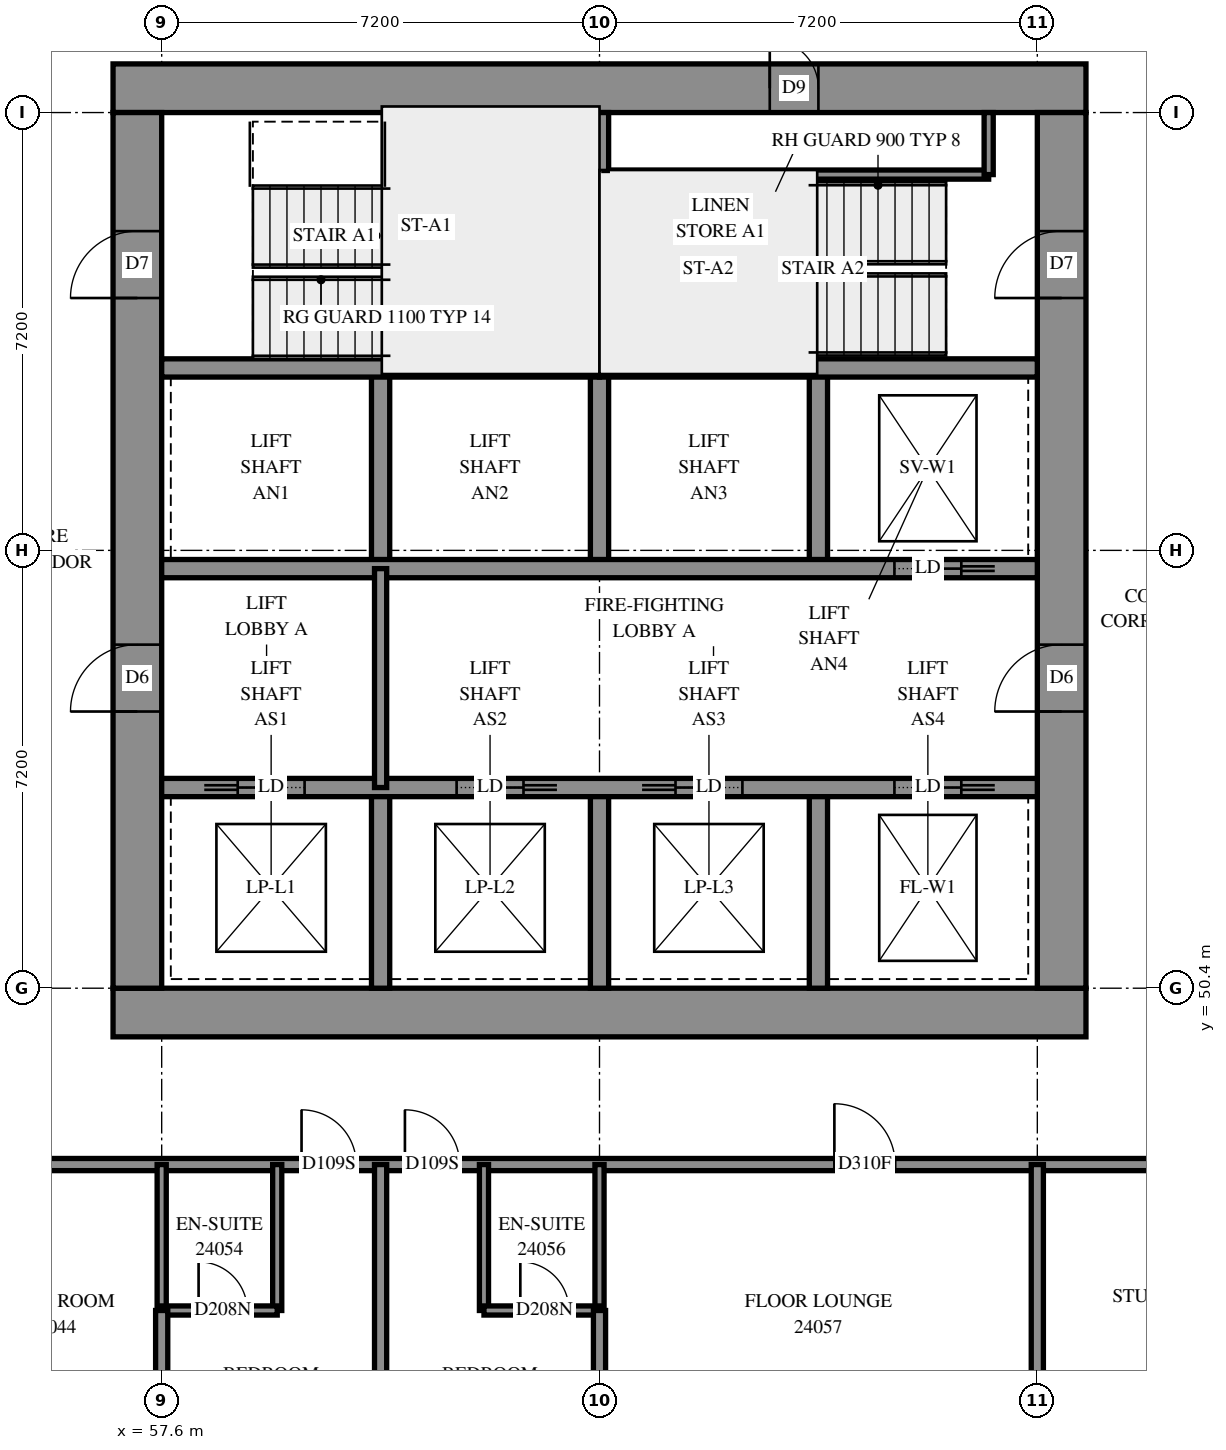
"""IFC4 building model, lengths in metres.
Left out: names, types, materials, properties, quantities, classifications, styles, units other than length and angle.
Written with IfcOpenShell. Run it as: python <this file> out.ifc"""

import sys

from ifc_helpers import new_model, si_unit, direction, frame, frame_2d, origin, place, context, subcontext, project, spatial, rectangle, extrude, element, fill, save


model = new_model("IFC4")
c1 = context("Model", 3, precision=1e-05, world=origin(), true_north=direction((0.0, 1.0)))
c2 = subcontext(c1, "Body", "Model", "MODEL_VIEW")
j1 = project(units=[si_unit("LENGTHUNIT", "METRE"), si_unit("PLANEANGLEUNIT", "RADIAN")], contexts=[c1])
p1 = place(None, origin())
s1 = spatial("IfcSite", under=j1, at=p1, CompositionType="ELEMENT")
p2 = place(p1, origin())
s2 = spatial("IfcBuilding", under=s1, at=p2, CompositionType="ELEMENT")
p3 = place(p2, frame((0.0, 0.0, 91.4)))
s3 = spatial("IfcBuildingStorey", under=s2, at=p3, CompositionType="ELEMENT", Elevation=91.4)
p4 = place(p3, frame((56.8, 50.0, -0.3), z_axis=(0.0, 0.0, 1.0), x_axis=(1.0, 0.0, 0.0)))
e1 = element("IfcWall", 1, at=p4, inside=s3, PredefinedType="SHEAR", context=c2, shape_type="SweptSolid", body=[
    extrude(rectangle(XDim=16.0, YDim=0.8, at=frame_2d((8.0, 0.0))), origin(), (0.0, 0.0, 1.0), 2.7),
])
p5 = place(p3, frame((56.8, 65.2, -0.3), z_axis=(0.0, 0.0, 1.0), x_axis=(1.0, 0.0, 0.0)))
e2 = element("IfcWall", 2, at=p5, inside=s3, PredefinedType="SHEAR", context=c2, shape_type="SweptSolid", body=[
    extrude(rectangle(XDim=16.0, YDim=0.8, at=frame_2d((8.0, 0.0))), origin(), (0.0, 0.0, 1.0), 2.7),
])
p6 = place(p5, frame((10.8, 0.0, 0.3)))
e3 = element("IfcOpeningElement", 3, at=p6, cuts=e2, PredefinedType="OPENING", context=c2, shape_type="SweptSolid", body=[
    extrude(rectangle(XDim=0.8, YDim=2.1, at=frame_2d((0.4, 1.05))), frame((0.0, 0.41, 0.0), z_axis=(0.0, -1.0, 0.0), x_axis=(1.0, 0.0, 0.0)), (0.0, 0.0, 1.0), 0.82),
])
p7 = place(p3, frame((57.2, 50.4, -0.3), z_axis=(0.0, 0.0, 1.0), x_axis=(0.0, 1.0, 0.0)))
e4 = element("IfcWall", 4, at=p7, inside=s3, PredefinedType="SHEAR", context=c2, shape_type="SweptSolid", body=[
    extrude(rectangle(XDim=14.4, YDim=0.8, at=frame_2d((7.2, 0.0))), origin(), (0.0, 0.0, 1.0), 2.7),
])
p8 = place(p7, frame((4.55, 0.0, 0.3)))
e5 = element("IfcOpeningElement", 5, at=p8, cuts=e4, PredefinedType="OPENING", context=c2, shape_type="SweptSolid", body=[
    extrude(rectangle(XDim=1.1, YDim=2.1, at=frame_2d((0.55, 1.05))), frame((0.0, 0.41, 0.0), z_axis=(0.0, -1.0, 0.0), x_axis=(1.0, 0.0, 0.0)), (0.0, 0.0, 1.0), 0.82),
])
p9 = place(p7, frame((11.35, 0.0, 0.3)))
e6 = element("IfcOpeningElement", 6, at=p9, cuts=e4, PredefinedType="OPENING", context=c2, shape_type="SweptSolid", body=[
    extrude(rectangle(XDim=1.1, YDim=2.1, at=frame_2d((0.55, 1.05))), frame((0.0, 0.41, 0.0), z_axis=(0.0, -1.0, 0.0), x_axis=(1.0, 0.0, 0.0)), (0.0, 0.0, 1.0), 0.82),
])
p10 = place(p3, frame((72.4, 50.4, -0.3), z_axis=(0.0, 0.0, 1.0), x_axis=(0.0, 1.0, 0.0)))
e7 = element("IfcWall", 7, at=p10, inside=s3, PredefinedType="SHEAR", context=c2, shape_type="SweptSolid", body=[
    extrude(rectangle(XDim=14.4, YDim=0.8, at=frame_2d((7.2, 0.0))), origin(), (0.0, 0.0, 1.0), 2.7),
])
p11 = place(p10, frame((4.55, 0.0, 0.3)))
e8 = element("IfcOpeningElement", 8, at=p11, cuts=e7, PredefinedType="OPENING", context=c2, shape_type="SweptSolid", body=[
    extrude(rectangle(XDim=1.1, YDim=2.1, at=frame_2d((0.55, 1.05))), frame((0.0, 0.41, 0.0), z_axis=(0.0, -1.0, 0.0), x_axis=(1.0, 0.0, 0.0)), (0.0, 0.0, 1.0), 0.82),
])
p12 = place(p10, frame((11.35, 0.0, 0.3)))
e9 = element("IfcOpeningElement", 9, at=p12, cuts=e7, PredefinedType="OPENING", context=c2, shape_type="SweptSolid", body=[
    extrude(rectangle(XDim=1.1, YDim=2.1, at=frame_2d((0.55, 1.05))), frame((0.0, 0.41, 0.0), z_axis=(0.0, -1.0, 0.0), x_axis=(1.0, 0.0, 0.0)), (0.0, 0.0, 1.0), 0.82),
])
for number, where, z_axis, x_axis in (
    (10, (61.2, 50.4, 0.0), (0.0, 0.0, 1.0), (0.0, 1.0, 0.0)),
    (11, (61.2, 57.3, 0.0), (0.0, 0.0, 1.0), (0.0, 1.0, 0.0)),
    (12, (64.8, 50.4, 0.0), (0.0, 0.0, 1.0), (0.0, 1.0, 0.0)),
    (13, (64.8, 57.3, 0.0), (0.0, 0.0, 1.0), (0.0, 1.0, 0.0)),
    (14, (68.4, 50.4, 0.0), (0.0, 0.0, 1.0), (0.0, 1.0, 0.0)),
    (15, (68.4, 57.3, 0.0), (0.0, 0.0, 1.0), (0.0, 1.0, 0.0)),
):
    element("IfcWall", number, at=place(p3, frame(where, z_axis=z_axis, x_axis=x_axis)), inside=s3, PredefinedType="SOLIDWALL", context=c2, shape_type="SweptSolid", body=[
        extrude(rectangle(XDim=3.3, YDim=0.3, at=frame_2d((1.65, 0.0))), origin(), (0.0, 0.0, 1.0), 3.1),
    ])
p13 = place(p3, frame((57.6, 53.7, 0.0), z_axis=(0.0, 0.0, 1.0), x_axis=(1.0, 0.0, 0.0)))
e16 = element("IfcWall", 16, at=p13, inside=s3, PredefinedType="SOLIDWALL", context=c2, shape_type="SweptSolid", body=[
    extrude(rectangle(XDim=14.4, YDim=0.3, at=frame_2d((7.2, 0.0))), origin(), (0.0, 0.0, 1.0), 3.1),
])
p14 = place(p13, frame((1.25, 0.0, 0.0)))
e17 = element("IfcOpeningElement", 17, at=p14, cuts=e16, PredefinedType="OPENING", context=c2, shape_type="SweptSolid", body=[
    extrude(rectangle(XDim=1.1, YDim=2.1, at=frame_2d((0.55, 1.05))), frame((0.0, 0.16, 0.0), z_axis=(0.0, -1.0, 0.0), x_axis=(1.0, 0.0, 0.0)), (0.0, 0.0, 1.0), 0.32),
])
p15 = place(p13, frame((4.85, 0.0, 0.0)))
e18 = element("IfcOpeningElement", 18, at=p15, cuts=e16, PredefinedType="OPENING", context=c2, shape_type="SweptSolid", body=[
    extrude(rectangle(XDim=1.1, YDim=2.1, at=frame_2d((0.55, 1.05))), frame((0.0, 0.16, 0.0), z_axis=(0.0, -1.0, 0.0), x_axis=(1.0, 0.0, 0.0)), (0.0, 0.0, 1.0), 0.32),
])
p16 = place(p13, frame((8.45, 0.0, 0.0)))
e19 = element("IfcOpeningElement", 19, at=p16, cuts=e16, PredefinedType="OPENING", context=c2, shape_type="SweptSolid", body=[
    extrude(rectangle(XDim=1.1, YDim=2.1, at=frame_2d((0.55, 1.05))), frame((0.0, 0.16, 0.0), z_axis=(0.0, -1.0, 0.0), x_axis=(1.0, 0.0, 0.0)), (0.0, 0.0, 1.0), 0.32),
])
p17 = place(p13, frame((12.05, 0.0, 0.0)))
e20 = element("IfcOpeningElement", 20, at=p17, cuts=e16, PredefinedType="OPENING", context=c2, shape_type="SweptSolid", body=[
    extrude(rectangle(XDim=1.1, YDim=2.1, at=frame_2d((0.55, 1.05))), frame((0.0, 0.16, 0.0), z_axis=(0.0, -1.0, 0.0), x_axis=(1.0, 0.0, 0.0)), (0.0, 0.0, 1.0), 0.32),
])
p18 = place(p3, frame((57.6, 57.3, 0.0), z_axis=(0.0, 0.0, 1.0), x_axis=(1.0, 0.0, 0.0)))
e21 = element("IfcWall", 21, at=p18, inside=s3, PredefinedType="SOLIDWALL", context=c2, shape_type="SweptSolid", body=[
    extrude(rectangle(XDim=14.4, YDim=0.3, at=frame_2d((7.2, 0.0))), origin(), (0.0, 0.0, 1.0), 3.1),
])
p19 = place(p18, frame((12.05, 0.0, 0.0)))
e22 = element("IfcOpeningElement", 22, at=p19, cuts=e21, PredefinedType="OPENING", context=c2, shape_type="SweptSolid", body=[
    extrude(rectangle(XDim=1.1, YDim=2.1, at=frame_2d((0.55, 1.05))), frame((0.0, 0.16, 0.0), z_axis=(0.0, -1.0, 0.0), x_axis=(1.0, 0.0, 0.0)), (0.0, 0.0, 1.0), 0.32),
])
for number, where, z_axis, x_axis in (
    (23, (57.6, 60.6, 0.0), (0.0, 0.0, 1.0), (1.0, 0.0, 0.0)),
    (24, (64.8, 60.6, 0.0), (0.0, 0.0, 1.0), (1.0, 0.0, 0.0)),
):
    element("IfcWall", number, at=place(p3, frame(where, z_axis=z_axis, x_axis=x_axis)), inside=s3, PredefinedType="SOLIDWALL", context=c2, shape_type="SweptSolid", body=[
        extrude(rectangle(XDim=7.2, YDim=0.3, at=frame_2d((3.6, 0.0))), origin(), (0.0, 0.0, 1.0), 3.1),
    ])
p20 = place(p3, frame((64.8, 60.6, 0.0), z_axis=(0.0, 0.0, 1.0), x_axis=(0.0, 1.0, 0.0)))
e25 = element("IfcWall", 25, at=p20, inside=s3, PredefinedType="SOLIDWALL", context=c2, shape_type="SweptSolid", body=[
    extrude(rectangle(XDim=4.2, YDim=0.3, at=frame_2d((2.1, 0.0))), origin(), (0.0, 0.0, 1.0), 3.1),
])
p21 = place(p3, frame((64.95, 63.78, 0.0), z_axis=(0.0, 0.0, 1.0), x_axis=(1.0, 0.0, 0.0)))
e26 = element("IfcWall", 26, at=p21, inside=s3, PredefinedType="PARTITIONING", context=c2, shape_type="SweptSolid", body=[
    extrude(rectangle(XDim=6.25, YDim=0.15, at=frame_2d((3.125, 0.0))), origin(), (0.0, 0.0, 1.0), 3.1),
])
p22 = place(p3, frame((71.2, 63.78, 0.0), z_axis=(0.0, 0.0, 1.0), x_axis=(0.0, 1.0, 0.0)))
e27 = element("IfcWall", 27, at=p22, inside=s3, PredefinedType="PARTITIONING", context=c2, shape_type="SweptSolid", body=[
    extrude(rectangle(XDim=1.02, YDim=0.15, at=frame_2d((0.51, 0.0))), origin(), (0.0, 0.0, 1.0), 3.1),
])
p23 = place(p3, frame((61.2, 53.7, 0.0), z_axis=(0.0, 0.0, 1.0), x_axis=(0.0, 1.0, 0.0)))
e28 = element("IfcWall", 28, at=p23, inside=s3, PredefinedType="PARTITIONING", context=c2, shape_type="SweptSolid", body=[
    extrude(rectangle(XDim=3.6, YDim=0.2, at=frame_2d((1.8, 0.0))), origin(), (0.0, 0.0, 1.0), 3.1),
])
p24 = place(p3, frame((54.7, 47.5, 0.0), z_axis=(0.0, 0.0, 1.0), x_axis=(1.0, 0.0, 0.0)))
e29 = element("IfcWall", 29, at=p24, inside=s3, PredefinedType="PARTITIONING", context=c2, shape_type="SweptSolid", body=[
    extrude(rectangle(XDim=19.442, YDim=0.2, at=frame_2d((9.721, 0.0))), origin(), (0.0, 0.0, 1.0), 3.1),
])
p25 = place(p24, frame((5.2, 0.0, 0.0)))
e30 = element("IfcOpeningElement", 30, at=p25, cuts=e29, PredefinedType="OPENING", context=c2, shape_type="SweptSolid", body=[
    extrude(rectangle(XDim=0.9, YDim=2.1, at=frame_2d((0.45, 1.05))), frame((0.0, 0.11, 0.0), z_axis=(0.0, -1.0, 0.0), x_axis=(1.0, 0.0, 0.0)), (0.0, 0.0, 1.0), 0.22),
])
p26 = place(p24, frame((6.9, 0.0, 0.0)))
e31 = element("IfcOpeningElement", 31, at=p26, cuts=e29, PredefinedType="OPENING", context=c2, shape_type="SweptSolid", body=[
    extrude(rectangle(XDim=0.9, YDim=2.1, at=frame_2d((0.45, 1.05))), frame((0.0, 0.11, 0.0), z_axis=(0.0, -1.0, 0.0), x_axis=(1.0, 0.0, 0.0)), (0.0, 0.0, 1.0), 0.22),
])
p27 = place(p24, frame((13.963, 0.0, 0.0)))
e32 = element("IfcOpeningElement", 32, at=p27, cuts=e29, PredefinedType="OPENING", context=c2, shape_type="SweptSolid", body=[
    extrude(rectangle(XDim=1.0, YDim=2.1, at=frame_2d((0.5, 1.05))), frame((0.0, 0.11, 0.0), z_axis=(0.0, -1.0, 0.0), x_axis=(1.0, 0.0, 0.0)), (0.0, 0.0, 1.0), 0.22),
])
p28 = place(p3, frame((61.2, 42.354, 0.0), z_axis=(0.0, 0.0, 1.0), x_axis=(0.0, 1.0, 0.0)))
e33 = element("IfcWall", 33, at=p28, inside=s3, PredefinedType="PARTITIONING", context=c2, shape_type="SweptSolid", body=[
    extrude(rectangle(XDim=5.146, YDim=0.2, at=frame_2d((2.573, 0.0))), origin(), (0.0, 0.0, 1.0), 3.1),
])
p29 = place(p3, frame((72.0, 43.7, 0.0), z_axis=(0.0, 0.0, 1.0), x_axis=(0.0, 1.0, 0.0)))
e34 = element("IfcWall", 34, at=p29, inside=s3, PredefinedType="PARTITIONING", context=c2, shape_type="SweptSolid", body=[
    extrude(rectangle(XDim=3.8, YDim=0.2, at=frame_2d((1.9, 0.0))), origin(), (0.0, 0.0, 1.0), 3.1),
])
for number, where, z_axis, x_axis in (
    (35, (59.5, 45.1, 0.0), (0.0, 0.0, 1.0), (0.0, 1.0, 0.0)),
    (36, (57.6, 45.1, 0.0), (0.0, 0.0, 1.0), (0.0, 1.0, 0.0)),
    (37, (62.9, 45.1, 0.0), (0.0, 0.0, 1.0), (0.0, 1.0, 0.0)),
    (38, (64.8, 45.1, 0.0), (0.0, 0.0, 1.0), (0.0, 1.0, 0.0)),
):
    element("IfcWall", number, at=place(p3, frame(where, z_axis=z_axis, x_axis=x_axis)), inside=s3, PredefinedType="PARTITIONING", context=c2, shape_type="SweptSolid", body=[
        extrude(rectangle(XDim=2.4, YDim=0.15, at=frame_2d((1.2, 0.0))), origin(), (0.0, 0.0, 1.0), 3.1),
    ])
p30 = place(p3, frame((57.6, 45.1, 0.0), z_axis=(0.0, 0.0, 1.0), x_axis=(1.0, 0.0, 0.0)))
e39 = element("IfcWall", 39, at=p30, inside=s3, PredefinedType="PARTITIONING", context=c2, shape_type="SweptSolid", body=[
    extrude(rectangle(XDim=1.9, YDim=0.15, at=frame_2d((0.95, 0.0))), origin(), (0.0, 0.0, 1.0), 3.1),
])
p31 = place(p30, frame((0.607, 0.0, 0.0)))
e40 = element("IfcOpeningElement", 40, at=p31, cuts=e39, PredefinedType="OPENING", context=c2, shape_type="SweptSolid", body=[
    extrude(rectangle(XDim=0.8, YDim=2.1, at=frame_2d((0.4, 1.05))), frame((0.0, 0.085, 0.0), z_axis=(0.0, -1.0, 0.0), x_axis=(1.0, 0.0, 0.0)), (0.0, 0.0, 1.0), 0.17),
])
p32 = place(p3, frame((62.9, 45.1, 0.0), z_axis=(0.0, 0.0, 1.0), x_axis=(1.0, 0.0, 0.0)))
e41 = element("IfcWall", 41, at=p32, inside=s3, PredefinedType="PARTITIONING", context=c2, shape_type="SweptSolid", body=[
    extrude(rectangle(XDim=1.9, YDim=0.15, at=frame_2d((0.95, 0.0))), origin(), (0.0, 0.0, 1.0), 3.1),
])
p33 = place(p32, frame((0.598, 0.0, 0.0)))
e42 = element("IfcOpeningElement", 42, at=p33, cuts=e41, PredefinedType="OPENING", context=c2, shape_type="SweptSolid", body=[
    extrude(rectangle(XDim=0.8, YDim=2.1, at=frame_2d((0.4, 1.05))), frame((0.0, 0.085, 0.0), z_axis=(0.0, -1.0, 0.0), x_axis=(1.0, 0.0, 0.0)), (0.0, 0.0, 1.0), 0.17),
])
for number, where, z_axis, x_axis in (
    (43, (57.6, 43.7, 0.0), (0.0, 0.0, 1.0), (0.0, 1.0, 0.0)),
    (44, (64.8, 43.7, 0.0), (0.0, 0.0, 1.0), (0.0, 1.0, 0.0)),
):
    element("IfcWall", number, at=place(p3, frame(where, z_axis=z_axis, x_axis=x_axis)), inside=s3, PredefinedType="PARTITIONING", context=c2, shape_type="SweptSolid", body=[
        extrude(rectangle(XDim=1.4, YDim=0.2, at=frame_2d((0.7, 0.0))), origin(), (0.0, 0.0, 1.0), 3.1),
    ])
p34 = place(p6, origin())
e45 = element("IfcDoor", 45, at=p34, inside=s3, OperationType="SINGLE_SWING_RIGHT", PredefinedType="DOOR", context=c2, shape_type="SweptSolid", body=[
    extrude(rectangle(XDim=0.8, YDim=2.1, at=frame_2d((0.4, 1.05))), frame((0.0, -0.34, 0.0), z_axis=(0.0, -1.0, 0.0), x_axis=(1.0, 0.0, 0.0)), (0.0, 0.0, 1.0), 0.05),
])
fill(e3, e45)
p35 = place(p8, origin())
e46 = element("IfcDoor", 46, at=p35, inside=s3, OperationType="DOUBLE_DOOR_SINGLE_SWING", PredefinedType="DOOR", context=c2, shape_type="SweptSolid", body=[
    extrude(rectangle(XDim=1.1, YDim=2.1, at=frame_2d((0.55, 1.05))), frame((0.0, 0.025, 0.0), z_axis=(0.0, -1.0, 0.0), x_axis=(1.0, 0.0, 0.0)), (0.0, 0.0, 1.0), 0.05),
])
fill(e5, e46)
p36 = place(p11, origin())
e47 = element("IfcDoor", 47, at=p36, inside=s3, OperationType="DOUBLE_DOOR_SINGLE_SWING", PredefinedType="DOOR", context=c2, shape_type="SweptSolid", body=[
    extrude(rectangle(XDim=1.1, YDim=2.1, at=frame_2d((0.55, 1.05))), frame((0.0, 0.025, 0.0), z_axis=(0.0, -1.0, 0.0), x_axis=(1.0, 0.0, 0.0)), (0.0, 0.0, 1.0), 0.05),
])
fill(e8, e47)
p37 = place(p9, origin())
e48 = element("IfcDoor", 48, at=p37, inside=s3, OperationType="SINGLE_SWING_LEFT", PredefinedType="DOOR", context=c2, shape_type="SweptSolid", body=[
    extrude(rectangle(XDim=1.1, YDim=2.1, at=frame_2d((0.55, 1.05))), frame((0.0, 0.025, 0.0), z_axis=(0.0, -1.0, 0.0), x_axis=(1.0, 0.0, 0.0)), (0.0, 0.0, 1.0), 0.05),
])
fill(e6, e48)
p38 = place(p12, origin())
e49 = element("IfcDoor", 49, at=p38, inside=s3, OperationType="SINGLE_SWING_RIGHT", PredefinedType="DOOR", context=c2, shape_type="SweptSolid", body=[
    extrude(rectangle(XDim=1.1, YDim=2.1, at=frame_2d((0.55, 1.05))), frame((0.0, 0.025, 0.0), z_axis=(0.0, -1.0, 0.0), x_axis=(1.0, 0.0, 0.0)), (0.0, 0.0, 1.0), 0.05),
])
fill(e9, e49)
p39 = place(p14, origin())
e50 = element("IfcDoor", 50, at=p39, inside=s3, OperationType="SLIDING_TO_LEFT", PredefinedType="DOOR", context=c2, shape_type="SweptSolid", body=[
    extrude(rectangle(XDim=1.1, YDim=2.1, at=frame_2d((0.55, 1.05))), frame((0.0, 0.025, 0.0), z_axis=(0.0, -1.0, 0.0), x_axis=(1.0, 0.0, 0.0)), (0.0, 0.0, 1.0), 0.05),
])
fill(e17, e50)
p40 = place(p15, origin())
e51 = element("IfcDoor", 51, at=p40, inside=s3, OperationType="SLIDING_TO_RIGHT", PredefinedType="DOOR", context=c2, shape_type="SweptSolid", body=[
    extrude(rectangle(XDim=1.1, YDim=2.1, at=frame_2d((0.55, 1.05))), frame((0.0, 0.025, 0.0), z_axis=(0.0, -1.0, 0.0), x_axis=(1.0, 0.0, 0.0)), (0.0, 0.0, 1.0), 0.05),
])
fill(e18, e51)
p41 = place(p16, origin())
e52 = element("IfcDoor", 52, at=p41, inside=s3, OperationType="SLIDING_TO_LEFT", PredefinedType="DOOR", context=c2, shape_type="SweptSolid", body=[
    extrude(rectangle(XDim=1.1, YDim=2.1, at=frame_2d((0.55, 1.05))), frame((0.0, 0.025, 0.0), z_axis=(0.0, -1.0, 0.0), x_axis=(1.0, 0.0, 0.0)), (0.0, 0.0, 1.0), 0.05),
])
fill(e19, e52)
p42 = place(p17, origin())
e53 = element("IfcDoor", 53, at=p42, inside=s3, OperationType="SLIDING_TO_RIGHT", PredefinedType="DOOR", context=c2, shape_type="SweptSolid", body=[
    extrude(rectangle(XDim=1.1, YDim=2.1, at=frame_2d((0.55, 1.05))), frame((0.0, 0.025, 0.0), z_axis=(0.0, -1.0, 0.0), x_axis=(1.0, 0.0, 0.0)), (0.0, 0.0, 1.0), 0.05),
])
fill(e20, e53)
p43 = place(p19, origin())
e54 = element("IfcDoor", 54, at=p43, inside=s3, OperationType="SLIDING_TO_RIGHT", PredefinedType="DOOR", context=c2, shape_type="SweptSolid", body=[
    extrude(rectangle(XDim=1.1, YDim=2.1, at=frame_2d((0.55, 1.05))), frame((0.0, 0.025, 0.0), z_axis=(0.0, -1.0, 0.0), x_axis=(1.0, 0.0, 0.0)), (0.0, 0.0, 1.0), 0.05),
])
fill(e22, e54)
p44 = place(p25, origin())
e55 = element("IfcDoor", 55, at=p44, inside=s3, OperationType="SINGLE_SWING_LEFT", PredefinedType="DOOR", context=c2, shape_type="SweptSolid", body=[
    extrude(rectangle(XDim=0.9, YDim=2.1, at=frame_2d((0.45, 1.05))), frame((0.0, 0.025, 0.0), z_axis=(0.0, -1.0, 0.0), x_axis=(1.0, 0.0, 0.0)), (0.0, 0.0, 1.0), 0.05),
])
fill(e30, e55)
p45 = place(p31, origin())
e56 = element("IfcDoor", 56, at=p45, inside=s3, OperationType="SINGLE_SWING_RIGHT", PredefinedType="DOOR", context=c2, shape_type="SweptSolid", body=[
    extrude(rectangle(XDim=0.8, YDim=2.1, at=frame_2d((0.4, 1.05))), frame((0.0, 0.025, 0.0), z_axis=(0.0, -1.0, 0.0), x_axis=(1.0, 0.0, 0.0)), (0.0, 0.0, 1.0), 0.05),
])
fill(e40, e56)
p46 = place(p26, origin())
e57 = element("IfcDoor", 57, at=p46, inside=s3, OperationType="SINGLE_SWING_RIGHT", PredefinedType="DOOR", context=c2, shape_type="SweptSolid", body=[
    extrude(rectangle(XDim=0.9, YDim=2.1, at=frame_2d((0.45, 1.05))), frame((0.0, 0.025, 0.0), z_axis=(0.0, -1.0, 0.0), x_axis=(1.0, 0.0, 0.0)), (0.0, 0.0, 1.0), 0.05),
])
fill(e31, e57)
p47 = place(p33, origin())
e58 = element("IfcDoor", 58, at=p47, inside=s3, OperationType="SINGLE_SWING_RIGHT", PredefinedType="DOOR", context=c2, shape_type="SweptSolid", body=[
    extrude(rectangle(XDim=0.8, YDim=2.1, at=frame_2d((0.4, 1.05))), frame((0.0, 0.025, 0.0), z_axis=(0.0, -1.0, 0.0), x_axis=(1.0, 0.0, 0.0)), (0.0, 0.0, 1.0), 0.05),
])
fill(e42, e58)
p48 = place(p27, origin())
e59 = element("IfcDoor", 59, at=p48, inside=s3, OperationType="SINGLE_SWING_LEFT", PredefinedType="DOOR", context=c2, shape_type="SweptSolid", body=[
    extrude(rectangle(XDim=1.0, YDim=2.1, at=frame_2d((0.5, 1.05))), frame((0.0, 0.025, 0.0), z_axis=(0.0, -1.0, 0.0), x_axis=(1.0, 0.0, 0.0)), (0.0, 0.0, 1.0), 0.05),
])
fill(e32, e59)
save(model, sys.argv[1])
